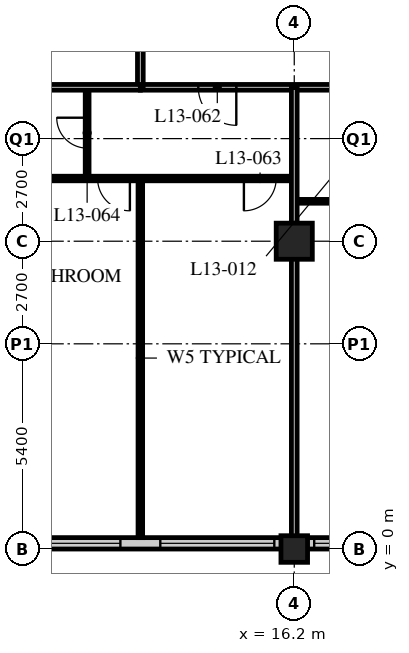
"""IFC4 building model, lengths in metres.
Left out: names, types, materials, properties, quantities, classifications, styles, units other than length and angle.
Written with IfcOpenShell. Run it as: python <this file> out.ifc"""

import sys

from ifc_helpers import new_model, si_unit, direction, frame, frame_2d, origin, origin_2d, place, context, subcontext, project, spatial, rectangle, hollow_rectangle, extrude, element, fill, save


model = new_model("IFC4")
c1 = context("Model", 3, precision=1e-05, world=origin(), true_north=direction((0.0, 1.0)))
c2 = subcontext(c1, "Body", "Model", "MODEL_VIEW")
j1 = project(units=[si_unit("LENGTHUNIT", "METRE"), si_unit("PLANEANGLEUNIT", "RADIAN")], contexts=[c1])
p1 = place(None, origin())
s1 = spatial("IfcSite", under=j1, at=p1, CompositionType="ELEMENT")
p2 = place(p1, origin())
s2 = spatial("IfcBuilding", under=s1, at=p2, CompositionType="ELEMENT")
p3 = place(p2, frame((0.0, 0.0, 56.8)))
s3 = spatial("IfcBuildingStorey", under=s2, at=p3, CompositionType="ELEMENT", Elevation=56.8)
p4 = place(p3, frame((16.2, 0.0, 0.0), z_axis=(0.0, 0.0, 1.0), x_axis=(1.0, 0.0, 0.0)))
e1 = element("IfcColumn", 1, at=p4, inside=s3, PredefinedType="COLUMN", context=c2, shape_type="SweptSolid", body=[
    extrude(hollow_rectangle(XDim=0.7, YDim=0.7, WallThickness=0.06, at=origin_2d()), origin(), (0.0, 0.0, 1.0), 3.4),
])
p5 = place(p3, frame((16.2, 8.1, 0.0), z_axis=(0.0, 0.0, 1.0), x_axis=(1.0, 0.0, 0.0)))
e2 = element("IfcColumn", 2, at=p5, inside=s3, PredefinedType="COLUMN", context=c2, shape_type="SweptSolid", body=[
    extrude(hollow_rectangle(XDim=0.95, YDim=0.95, WallThickness=0.095, at=origin_2d()), origin(), (0.0, 0.0, 1.0), 3.4),
])
p6 = place(p3, frame((8.4, 0.15, 0.0), z_axis=(0.0, 0.0, 1.0), x_axis=(1.0, 0.0, 0.0)))
e3 = element("IfcWall", 3, at=p6, inside=s3, PredefinedType="SOLIDWALL", context=c2, shape_type="SweptSolid", body=[
    extrude(rectangle(XDim=40.2, YDim=0.3, at=frame_2d((20.1, 0.0))), origin(), (0.0, 0.0, 1.0), 3.19),
])
p7 = place(p6, frame((0.225, 0.0, 0.9)))
e4 = element("IfcOpeningElement", 4, at=p7, cuts=e3, PredefinedType="OPENING", context=c2, shape_type="SweptSolid", body=[
    extrude(rectangle(XDim=3.0, YDim=2.0, at=frame_2d((1.5, 1.0))), frame((0.0, 0.16, 0.0), z_axis=(0.0, -1.0, 0.0), x_axis=(1.0, 0.0, 0.0)), (0.0, 0.0, 1.0), 0.32),
])
p8 = place(p6, frame((4.275, 0.0, 0.9)))
e5 = element("IfcOpeningElement", 5, at=p8, cuts=e3, PredefinedType="OPENING", context=c2, shape_type="SweptSolid", body=[
    extrude(rectangle(XDim=3.0, YDim=2.0, at=frame_2d((1.5, 1.0))), frame((0.0, 0.16, 0.0), z_axis=(0.0, -1.0, 0.0), x_axis=(1.0, 0.0, 0.0)), (0.0, 0.0, 1.0), 0.32),
])
p9 = place(p6, frame((8.325, 0.0, 0.9)))
e6 = element("IfcOpeningElement", 6, at=p9, cuts=e3, PredefinedType="OPENING", context=c2, shape_type="SweptSolid", body=[
    extrude(rectangle(XDim=3.0, YDim=2.0, at=frame_2d((1.5, 1.0))), frame((0.0, 0.16, 0.0), z_axis=(0.0, -1.0, 0.0), x_axis=(1.0, 0.0, 0.0)), (0.0, 0.0, 1.0), 0.32),
])
p10 = place(p6, frame((12.375, 0.0, 0.9)))
e7 = element("IfcOpeningElement", 7, at=p10, cuts=e3, PredefinedType="OPENING", context=c2, shape_type="SweptSolid", body=[
    extrude(rectangle(XDim=3.0, YDim=2.0, at=frame_2d((1.5, 1.0))), frame((0.0, 0.16, 0.0), z_axis=(0.0, -1.0, 0.0), x_axis=(1.0, 0.0, 0.0)), (0.0, 0.0, 1.0), 0.32),
])
p11 = place(p6, frame((16.425, 0.0, 0.9)))
e8 = element("IfcOpeningElement", 8, at=p11, cuts=e3, PredefinedType="OPENING", context=c2, shape_type="SweptSolid", body=[
    extrude(rectangle(XDim=3.0, YDim=2.0, at=frame_2d((1.5, 1.0))), frame((0.0, 0.16, 0.0), z_axis=(0.0, -1.0, 0.0), x_axis=(1.0, 0.0, 0.0)), (0.0, 0.0, 1.0), 0.32),
])
p12 = place(p6, frame((20.475, 0.0, 0.9)))
e9 = element("IfcOpeningElement", 9, at=p12, cuts=e3, PredefinedType="OPENING", context=c2, shape_type="SweptSolid", body=[
    extrude(rectangle(XDim=3.0, YDim=2.0, at=frame_2d((1.5, 1.0))), frame((0.0, 0.16, 0.0), z_axis=(0.0, -1.0, 0.0), x_axis=(1.0, 0.0, 0.0)), (0.0, 0.0, 1.0), 0.32),
])
p13 = place(p6, frame((24.525, 0.0, 0.9)))
e10 = element("IfcOpeningElement", 10, at=p13, cuts=e3, PredefinedType="OPENING", context=c2, shape_type="SweptSolid", body=[
    extrude(rectangle(XDim=3.0, YDim=2.0, at=frame_2d((1.5, 1.0))), frame((0.0, 0.16, 0.0), z_axis=(0.0, -1.0, 0.0), x_axis=(1.0, 0.0, 0.0)), (0.0, 0.0, 1.0), 0.32),
])
p14 = place(p6, frame((28.575, 0.0, 0.9)))
e11 = element("IfcOpeningElement", 11, at=p14, cuts=e3, PredefinedType="OPENING", context=c2, shape_type="SweptSolid", body=[
    extrude(rectangle(XDim=3.0, YDim=2.0, at=frame_2d((1.5, 1.0))), frame((0.0, 0.16, 0.0), z_axis=(0.0, -1.0, 0.0), x_axis=(1.0, 0.0, 0.0)), (0.0, 0.0, 1.0), 0.32),
])
p15 = place(p6, frame((32.625, 0.0, 0.9)))
e12 = element("IfcOpeningElement", 12, at=p15, cuts=e3, PredefinedType="OPENING", context=c2, shape_type="SweptSolid", body=[
    extrude(rectangle(XDim=3.0, YDim=2.0, at=frame_2d((1.5, 1.0))), frame((0.0, 0.16, 0.0), z_axis=(0.0, -1.0, 0.0), x_axis=(1.0, 0.0, 0.0)), (0.0, 0.0, 1.0), 0.32),
])
p16 = place(p6, frame((36.675, 0.0, 0.9)))
e13 = element("IfcOpeningElement", 13, at=p16, cuts=e3, PredefinedType="OPENING", context=c2, shape_type="SweptSolid", body=[
    extrude(rectangle(XDim=3.0, YDim=2.0, at=frame_2d((1.5, 1.0))), frame((0.0, 0.16, 0.0), z_axis=(0.0, -1.0, 0.0), x_axis=(1.0, 0.0, 0.0)), (0.0, 0.0, 1.0), 0.32),
])
p17 = place(p3, frame((12.15, 12.15, 0.0), z_axis=(0.0, 0.0, 1.0), x_axis=(1.0, 0.0, 0.0)))
e14 = element("IfcWall", 14, at=p17, inside=s3, PredefinedType="PARTITIONING", context=c2, shape_type="SweptSolid", body=[
    extrude(rectangle(XDim=32.4, YDim=0.15, at=frame_2d((16.2, 0.0))), origin(), (0.0, 0.0, 1.0), 3.19),
])
p18 = place(p17, frame((6.5, 0.0, 0.0)))
e15 = element("IfcOpeningElement", 15, at=p18, cuts=e14, PredefinedType="OPENING", context=c2, shape_type="SweptSolid", body=[
    extrude(rectangle(XDim=1.0, YDim=2.1, at=frame_2d((0.5, 1.05))), frame((0.0, 0.085, 0.0), z_axis=(0.0, -1.0, 0.0), x_axis=(1.0, 0.0, 0.0)), (0.0, 0.0, 1.0), 0.17),
])
p19 = place(p17, frame((8.4, 0.0, 0.0)))
e16 = element("IfcOpeningElement", 16, at=p19, cuts=e14, PredefinedType="OPENING", context=c2, shape_type="SweptSolid", body=[
    extrude(rectangle(XDim=1.0, YDim=2.1, at=frame_2d((0.5, 1.05))), frame((0.0, 0.085, 0.0), z_axis=(0.0, -1.0, 0.0), x_axis=(1.0, 0.0, 0.0)), (0.0, 0.0, 1.0), 0.17),
])
p20 = place(p17, frame((14.6, 0.0, 0.0)))
e17 = element("IfcOpeningElement", 17, at=p20, cuts=e14, PredefinedType="OPENING", context=c2, shape_type="SweptSolid", body=[
    extrude(rectangle(XDim=1.0, YDim=2.1, at=frame_2d((0.5, 1.05))), frame((0.0, 0.085, 0.0), z_axis=(0.0, -1.0, 0.0), x_axis=(1.0, 0.0, 0.0)), (0.0, 0.0, 1.0), 0.17),
])
p21 = place(p17, frame((18.65, 0.0, 0.0)))
e18 = element("IfcOpeningElement", 18, at=p21, cuts=e14, PredefinedType="OPENING", context=c2, shape_type="SweptSolid", body=[
    extrude(rectangle(XDim=1.0, YDim=2.1, at=frame_2d((0.5, 1.05))), frame((0.0, 0.085, 0.0), z_axis=(0.0, -1.0, 0.0), x_axis=(1.0, 0.0, 0.0)), (0.0, 0.0, 1.0), 0.17),
])
p22 = place(p17, frame((20.55, 0.0, 0.0)))
e19 = element("IfcOpeningElement", 19, at=p22, cuts=e14, PredefinedType="OPENING", context=c2, shape_type="SweptSolid", body=[
    extrude(rectangle(XDim=1.0, YDim=2.1, at=frame_2d((0.5, 1.05))), frame((0.0, 0.085, 0.0), z_axis=(0.0, -1.0, 0.0), x_axis=(1.0, 0.0, 0.0)), (0.0, 0.0, 1.0), 0.17),
])
p23 = place(p17, frame((26.75, 0.0, 0.0)))
e20 = element("IfcOpeningElement", 20, at=p23, cuts=e14, PredefinedType="OPENING", context=c2, shape_type="SweptSolid", body=[
    extrude(rectangle(XDim=1.0, YDim=2.1, at=frame_2d((0.5, 1.05))), frame((0.0, 0.085, 0.0), z_axis=(0.0, -1.0, 0.0), x_axis=(1.0, 0.0, 0.0)), (0.0, 0.0, 1.0), 0.17),
])
p24 = place(p17, frame((1.525, 0.0, 0.0)))
e21 = element("IfcOpeningElement", 21, at=p24, cuts=e14, PredefinedType="OPENING", context=c2, shape_type="SweptSolid", body=[
    extrude(rectangle(XDim=1.0, YDim=2.1, at=frame_2d((0.5, 1.05))), frame((0.0, 0.085, 0.0), z_axis=(0.0, -1.0, 0.0), x_axis=(1.0, 0.0, 0.0)), (0.0, 0.0, 1.0), 0.17),
])
p25 = place(p17, frame((29.875, 0.0, 0.0)))
e22 = element("IfcOpeningElement", 22, at=p25, cuts=e14, PredefinedType="OPENING", context=c2, shape_type="SweptSolid", body=[
    extrude(rectangle(XDim=1.0, YDim=2.1, at=frame_2d((0.5, 1.05))), frame((0.0, 0.085, 0.0), z_axis=(0.0, -1.0, 0.0), x_axis=(1.0, 0.0, 0.0)), (0.0, 0.0, 1.0), 0.17),
])
p26 = place(p3, frame((12.15, 12.15, 0.0), z_axis=(0.0, 0.0, 1.0), x_axis=(0.0, 1.0, 0.0)))
e23 = element("IfcWall", 23, at=p26, inside=s3, PredefinedType="PARTITIONING", context=c2, shape_type="SweptSolid", body=[
    extrude(rectangle(XDim=30.15, YDim=0.15, at=frame_2d((15.075, 0.0))), origin(), (0.0, 0.0, 1.0), 3.19),
])
p27 = place(p26, frame((2.45, 0.0, 0.0)))
e24 = element("IfcOpeningElement", 24, at=p27, cuts=e23, PredefinedType="OPENING", context=c2, shape_type="SweptSolid", body=[
    extrude(rectangle(XDim=1.0, YDim=2.1, at=frame_2d((0.5, 1.05))), frame((0.0, 0.085, 0.0), z_axis=(0.0, -1.0, 0.0), x_axis=(1.0, 0.0, 0.0)), (0.0, 0.0, 1.0), 0.17),
])
p28 = place(p26, frame((6.5, 0.0, 0.0)))
e25 = element("IfcOpeningElement", 25, at=p28, cuts=e23, PredefinedType="OPENING", context=c2, shape_type="SweptSolid", body=[
    extrude(rectangle(XDim=1.0, YDim=2.1, at=frame_2d((0.5, 1.05))), frame((0.0, 0.085, 0.0), z_axis=(0.0, -1.0, 0.0), x_axis=(1.0, 0.0, 0.0)), (0.0, 0.0, 1.0), 0.17),
])
p29 = place(p26, frame((10.55, 0.0, 0.0)))
e26 = element("IfcOpeningElement", 26, at=p29, cuts=e23, PredefinedType="OPENING", context=c2, shape_type="SweptSolid", body=[
    extrude(rectangle(XDim=1.0, YDim=2.1, at=frame_2d((0.5, 1.05))), frame((0.0, 0.085, 0.0), z_axis=(0.0, -1.0, 0.0), x_axis=(1.0, 0.0, 0.0)), (0.0, 0.0, 1.0), 0.17),
])
p30 = place(p26, frame((14.6, 0.0, 0.0)))
e27 = element("IfcOpeningElement", 27, at=p30, cuts=e23, PredefinedType="OPENING", context=c2, shape_type="SweptSolid", body=[
    extrude(rectangle(XDim=1.0, YDim=2.1, at=frame_2d((0.5, 1.05))), frame((0.0, 0.085, 0.0), z_axis=(0.0, -1.0, 0.0), x_axis=(1.0, 0.0, 0.0)), (0.0, 0.0, 1.0), 0.17),
])
p31 = place(p26, frame((21.65, 0.0, 0.0)))
e28 = element("IfcOpeningElement", 28, at=p31, cuts=e23, PredefinedType="OPENING", context=c2, shape_type="SweptSolid", body=[
    extrude(rectangle(XDim=1.0, YDim=2.1, at=frame_2d((0.5, 1.05))), frame((0.0, 0.085, 0.0), z_axis=(0.0, -1.0, 0.0), x_axis=(1.0, 0.0, 0.0)), (0.0, 0.0, 1.0), 0.17),
])
p32 = place(p26, frame((26.7, 0.0, 0.0)))
e29 = element("IfcOpeningElement", 29, at=p32, cuts=e23, PredefinedType="OPENING", context=c2, shape_type="SweptSolid", body=[
    extrude(rectangle(XDim=1.0, YDim=2.1, at=frame_2d((0.5, 1.05))), frame((0.0, 0.085, 0.0), z_axis=(0.0, -1.0, 0.0), x_axis=(1.0, 0.0, 0.0)), (0.0, 0.0, 1.0), 0.17),
])
p33 = place(p3, frame((16.2, 9.15, 0.0), z_axis=(0.0, 0.0, 1.0), x_axis=(1.0, 0.0, 0.0)))
e30 = element("IfcWall", 30, at=p33, inside=s3, PredefinedType="PARTITIONING", context=c2, shape_type="SweptSolid", body=[
    extrude(rectangle(XDim=2.3, YDim=0.1, at=frame_2d((1.15, 0.0))), origin(), (0.0, 0.0, 1.0), 3.19),
])
p34 = place(p3, frame((10.75, 12.15, 0.0), z_axis=(0.0, 0.0, 1.0), x_axis=(0.0, -1.0, 0.0)))
e31 = element("IfcWall", 31, at=p34, inside=s3, PredefinedType="PARTITIONING", context=c2, shape_type="SweptSolid", body=[
    extrude(rectangle(XDim=2.4, YDim=0.1, at=frame_2d((1.2, 0.0))), origin(), (0.0, 0.0, 1.0), 3.19),
])
p35 = place(p34, frame((0.8, 0.0, 0.0)))
e32 = element("IfcOpeningElement", 32, at=p35, cuts=e31, PredefinedType="OPENING", context=c2, shape_type="SweptSolid", body=[
    extrude(rectangle(XDim=0.8, YDim=2.1, at=frame_2d((0.4, 1.05))), frame((0.0, 0.06, 0.0), z_axis=(0.0, -1.0, 0.0), x_axis=(1.0, 0.0, 0.0)), (0.0, 0.0, 1.0), 0.12),
])
p36 = place(p3, frame((8.15, 9.75, 0.0), z_axis=(0.0, 0.0, 1.0), x_axis=(1.0, 0.0, 0.0)))
e33 = element("IfcWall", 33, at=p36, inside=s3, PredefinedType="PARTITIONING", context=c2, shape_type="SweptSolid", body=[
    extrude(rectangle(XDim=8.05, YDim=0.12, at=frame_2d((4.025, 0.0))), origin(), (0.0, 0.0, 1.0), 3.19),
])
p37 = place(p36, frame((6.725, 0.0, 0.0)))
e34 = element("IfcOpeningElement", 34, at=p37, cuts=e33, PredefinedType="OPENING", context=c2, shape_type="SweptSolid", body=[
    extrude(rectangle(XDim=0.85, YDim=2.1, at=frame_2d((0.425, 1.05))), frame((0.0, 0.07, 0.0), z_axis=(0.0, -1.0, 0.0), x_axis=(1.0, 0.0, 0.0)), (0.0, 0.0, 1.0), 0.14),
])
p38 = place(p36, frame((2.875, 0.0, 0.0)))
e35 = element("IfcOpeningElement", 35, at=p38, cuts=e33, PredefinedType="OPENING", context=c2, shape_type="SweptSolid", body=[
    extrude(rectangle(XDim=0.85, YDim=2.1, at=frame_2d((0.425, 1.05))), frame((0.0, 0.07, 0.0), z_axis=(0.0, -1.0, 0.0), x_axis=(1.0, 0.0, 0.0)), (0.0, 0.0, 1.0), 0.14),
])
p39 = place(p3, frame((12.15, 9.75, 0.0), z_axis=(0.0, 0.0, 1.0), x_axis=(0.0, -1.0, 0.0)))
e36 = element("IfcWall", 36, at=p39, inside=s3, PredefinedType="PARTITIONING", context=c2, shape_type="SweptSolid", body=[
    extrude(rectangle(XDim=9.45, YDim=0.12, at=frame_2d((4.725, 0.0))), origin(), (0.0, 0.0, 1.0), 3.19),
])
p40 = place(p3, frame((0.3, 12.15, 0.0), z_axis=(0.0, 0.0, 1.0), x_axis=(1.0, 0.0, 0.0)))
e37 = element("IfcWall", 37, at=p40, inside=s3, PredefinedType="PARTITIONING", context=c2, shape_type="SweptSolid", body=[
    extrude(rectangle(XDim=11.85, YDim=0.15, at=frame_2d((5.925, 0.0))), origin(), (0.0, 0.0, 1.0), 3.19),
])
p41 = place(p3, frame((16.2, 12.15, 0.0), z_axis=(0.0, 0.0, 1.0), x_axis=(0.0, -1.0, 0.0)))
e38 = element("IfcWall", 38, at=p41, inside=s3, PredefinedType="PARTITIONING", context=c2, shape_type="SweptSolid", body=[
    extrude(rectangle(XDim=11.85, YDim=0.15, at=frame_2d((5.925, 0.0))), origin(), (0.0, 0.0, 1.0), 2.578),
])
p42 = place(p7, origin())
e39 = element("IfcWindow", 39, at=p42, inside=s3, PartitioningType="SINGLE_PANEL", PredefinedType="WINDOW", context=c2, shape_type="SweptSolid", body=[
    extrude(rectangle(XDim=3.0, YDim=2.0, at=frame_2d((1.5, 1.0))), frame((0.0, 0.03, 0.0), z_axis=(0.0, -1.0, 0.0), x_axis=(1.0, 0.0, 0.0)), (0.0, 0.0, 1.0), 0.06),
])
fill(e4, e39)
p43 = place(p8, origin())
e40 = element("IfcWindow", 40, at=p43, inside=s3, PartitioningType="SINGLE_PANEL", PredefinedType="WINDOW", context=c2, shape_type="SweptSolid", body=[
    extrude(rectangle(XDim=3.0, YDim=2.0, at=frame_2d((1.5, 1.0))), frame((0.0, 0.03, 0.0), z_axis=(0.0, -1.0, 0.0), x_axis=(1.0, 0.0, 0.0)), (0.0, 0.0, 1.0), 0.06),
])
fill(e5, e40)
p44 = place(p9, origin())
e41 = element("IfcWindow", 41, at=p44, inside=s3, PartitioningType="SINGLE_PANEL", PredefinedType="WINDOW", context=c2, shape_type="SweptSolid", body=[
    extrude(rectangle(XDim=3.0, YDim=2.0, at=frame_2d((1.5, 1.0))), frame((0.0, 0.03, 0.0), z_axis=(0.0, -1.0, 0.0), x_axis=(1.0, 0.0, 0.0)), (0.0, 0.0, 1.0), 0.06),
])
fill(e6, e41)
p45 = place(p24, origin())
e42 = element("IfcDoor", 42, at=p45, inside=s3, OperationType="SINGLE_SWING_LEFT", PredefinedType="DOOR", context=c2, shape_type="SweptSolid", body=[
    extrude(rectangle(XDim=1.0, YDim=2.1, at=frame_2d((0.5, 1.05))), frame((0.0, 0.025, 0.0), z_axis=(0.0, -1.0, 0.0), x_axis=(1.0, 0.0, 0.0)), (0.0, 0.0, 1.0), 0.05),
])
fill(e21, e42)
p46 = place(p37, origin())
e43 = element("IfcDoor", 43, at=p46, inside=s3, OperationType="SINGLE_SWING_RIGHT", PredefinedType="DOOR", context=c2, shape_type="SweptSolid", body=[
    extrude(rectangle(XDim=0.85, YDim=2.1, at=frame_2d((0.425, 1.05))), frame((0.0, 0.025, 0.0), z_axis=(0.0, -1.0, 0.0), x_axis=(1.0, 0.0, 0.0)), (0.0, 0.0, 1.0), 0.05),
])
fill(e34, e43)
p47 = place(p35, origin())
e44 = element("IfcDoor", 44, at=p47, inside=s3, OperationType="SINGLE_SWING_RIGHT", PredefinedType="DOOR", context=c2, shape_type="SweptSolid", body=[
    extrude(rectangle(XDim=0.8, YDim=2.1, at=frame_2d((0.4, 1.05))), frame((0.0, 0.025, 0.0), z_axis=(0.0, -1.0, 0.0), x_axis=(1.0, 0.0, 0.0)), (0.0, 0.0, 1.0), 0.05),
])
fill(e32, e44)
p48 = place(p38, origin())
e45 = element("IfcDoor", 45, at=p48, inside=s3, OperationType="SINGLE_SWING_LEFT", PredefinedType="DOOR", context=c2, shape_type="SweptSolid", body=[
    extrude(rectangle(XDim=0.85, YDim=2.1, at=frame_2d((0.425, 1.05))), frame((0.0, 0.025, 0.0), z_axis=(0.0, -1.0, 0.0), x_axis=(1.0, 0.0, 0.0)), (0.0, 0.0, 1.0), 0.05),
])
fill(e35, e45)
save(model, sys.argv[1])
